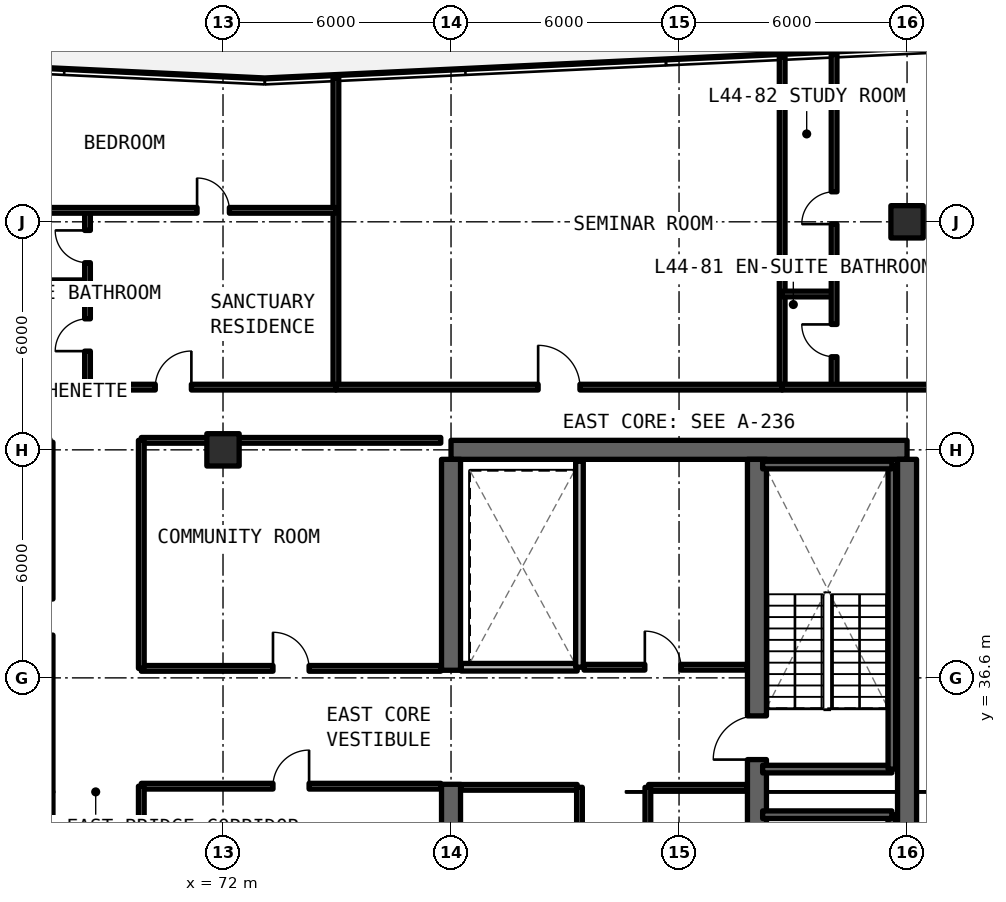
"""IFC4 building model, lengths in metres.
Left out: names, types, materials, properties, quantities, classifications, styles, units other than length and angle.
Written with IfcOpenShell. Run it as: python <this file> out.ifc"""

import sys

from ifc_helpers import new_model, si_unit, direction, frame, frame_2d, origin, origin_2d, place, context, subcontext, project, spatial, rectangle, extrude, element, fill, save


model = new_model("IFC4")
c1 = context("Model", 3, precision=1e-05, world=origin(), true_north=direction((0.0, 1.0)))
c2 = subcontext(c1, "Body", "Model", "MODEL_VIEW")
j1 = project(units=[si_unit("LENGTHUNIT", "METRE"), si_unit("PLANEANGLEUNIT", "RADIAN")], contexts=[c1])
p1 = place(None, origin())
s1 = spatial("IfcSite", under=j1, at=p1, CompositionType="ELEMENT")
p2 = place(p1, origin())
s2 = spatial("IfcBuilding", under=s1, at=p2, CompositionType="ELEMENT")
p3 = place(p2, frame((0.0, 0.0, 158.4)))
s3 = spatial("IfcBuildingStorey", under=s2, at=p3, CompositionType="ELEMENT", Elevation=158.4)
p4 = place(p3, frame((90.0, 42.6, 0.0), z_axis=(0.0, 0.0, 1.0), x_axis=(-1.0, 0.0, 0.0)))
e1 = element("IfcWall", 1, at=p4, inside=s3, PredefinedType="SHEAR", context=c2, shape_type="SweptSolid", body=[
    extrude(rectangle(XDim=12.0, YDim=0.5, at=frame_2d((6.0, 0.0))), origin(), (0.0, 0.0, 1.0), 3.63),
])
p5 = place(p3, frame((90.0, 24.85, 0.0), z_axis=(0.0, 0.0, 1.0), x_axis=(0.0, 1.0, 0.0)))
e2 = element("IfcWall", 2, at=p5, inside=s3, PredefinedType="SHEAR", context=c2, shape_type="SweptSolid", body=[
    extrude(rectangle(XDim=17.5, YDim=0.5, at=frame_2d((8.75, 0.0))), origin(), (0.0, 0.0, 1.0), 3.63),
])
p6 = place(p3, frame((78.0, 24.85, 0.0), z_axis=(0.0, 0.0, 1.0), x_axis=(0.0, 1.0, 0.0)))
e3 = element("IfcWall", 3, at=p6, inside=s3, PredefinedType="SHEAR", context=c2, shape_type="SweptSolid", body=[
    extrude(rectangle(XDim=8.95, YDim=0.5, at=frame_2d((4.475, 0.0))), origin(), (0.0, 0.0, 1.0), 3.63),
])
p7 = place(p3, frame((78.0, 36.8, 0.0), z_axis=(0.0, 0.0, 1.0), x_axis=(0.0, 1.0, 0.0)))
e4 = element("IfcWall", 4, at=p7, inside=s3, PredefinedType="SHEAR", context=c2, shape_type="SweptSolid", body=[
    extrude(rectangle(XDim=5.55, YDim=0.5, at=frame_2d((2.775, 0.0))), origin(), (0.0, 0.0, 1.0), 3.63),
])
p8 = place(p3, frame((86.05, 24.85, 0.0), z_axis=(0.0, 0.0, 1.0), x_axis=(0.0, 1.0, 0.0)))
e5 = element("IfcWall", 5, at=p8, inside=s3, PredefinedType="SHEAR", context=c2, shape_type="SweptSolid", body=[
    extrude(rectangle(XDim=17.5, YDim=0.5, at=frame_2d((8.75, 0.0))), origin(), (0.0, 0.0, 1.0), 3.63),
])
p9 = place(p8, frame((0.4, 0.0, 0.0)))
e6 = element("IfcOpeningElement", 6, at=p9, cuts=e5, PredefinedType="OPENING", context=c2, shape_type="SweptSolid", body=[
    extrude(rectangle(XDim=1.15, YDim=2.15, at=frame_2d((0.575, 1.075))), frame((0.0, 0.26, 0.0), z_axis=(0.0, -1.0, 0.0), x_axis=(1.0, 0.0, 0.0)), (0.0, 0.0, 1.0), 0.52),
])
p10 = place(p8, frame((9.6, 0.0, 0.0)))
e7 = element("IfcOpeningElement", 7, at=p10, cuts=e5, PredefinedType="OPENING", context=c2, shape_type="SweptSolid", body=[
    extrude(rectangle(XDim=1.15, YDim=2.15, at=frame_2d((0.575, 1.075))), frame((0.0, 0.26, 0.0), z_axis=(0.0, -1.0, 0.0), x_axis=(1.0, 0.0, 0.0)), (0.0, 0.0, 1.0), 0.52),
])
for number, where, z_axis, x_axis in (
    (8, (72.0, 42.6, 0.0), (0.0, 0.0, 1.0), (1.0, 0.0, 0.0)),
    (9, (90.0, 48.6, 0.0), (0.0, 0.0, 1.0), (1.0, 0.0, 0.0)),
):
    element("IfcColumn", number, at=place(p3, frame(where, z_axis=z_axis, x_axis=x_axis)), inside=s3, PredefinedType="COLUMN", context=c2, shape_type="SweptSolid", body=[
        extrude(rectangle(XDim=0.85, YDim=0.85, at=origin_2d()), origin(), (0.0, 0.0, 1.0), 3.63),
    ])
p11 = place(p3, frame((83.2, 33.72, 0.0), z_axis=(0.0, 0.0, 1.0), x_axis=(1.0, 0.0, 0.0)))
e10 = element("IfcWall", 10, at=p11, inside=s3, PredefinedType="SOLIDWALL", context=c2, shape_type="SweptSolid", body=[
    extrude(rectangle(XDim=2.58, YDim=0.15, at=frame_2d((1.29, 0.0))), origin(), (0.0, 0.0, 1.0), 2.63),
])
p12 = place(p3, frame((83.18, 28.5, 0.0), z_axis=(0.0, 0.0, 1.0), x_axis=(0.0, 1.0, 0.0)))
e11 = element("IfcWall", 11, at=p12, inside=s3, PredefinedType="SOLIDWALL", context=c2, shape_type="SweptSolid", body=[
    extrude(rectangle(XDim=5.22, YDim=0.15, at=frame_2d((2.61, 0.0))), origin(), (0.0, 0.0, 1.0), 2.63),
])
p13 = place(p12, frame((2.1, 0.0, 0.0)))
e12 = element("IfcOpeningElement", 12, at=p13, cuts=e11, PredefinedType="OPENING", context=c2, shape_type="SweptSolid", body=[
    extrude(rectangle(XDim=0.95, YDim=2.15, at=frame_2d((0.475, 1.075))), frame((0.0, 0.085, 0.0), z_axis=(0.0, -1.0, 0.0), x_axis=(1.0, 0.0, 0.0)), (0.0, 0.0, 1.0), 0.17),
])
p14 = place(p3, frame((78.27, 33.72, 0.0), z_axis=(0.0, 0.0, 1.0), x_axis=(1.0, 0.0, 0.0)))
e13 = element("IfcWall", 13, at=p14, inside=s3, PredefinedType="SOLIDWALL", context=c2, shape_type="SweptSolid", body=[
    extrude(rectangle(XDim=3.05, YDim=0.15, at=frame_2d((1.525, 0.0))), origin(), (0.0, 0.0, 1.0), 2.63),
])
p15 = place(p3, frame((81.38, 28.5, 0.0), z_axis=(0.0, 0.0, 1.0), x_axis=(0.0, 1.0, 0.0)))
e14 = element("IfcWall", 14, at=p15, inside=s3, PredefinedType="SOLIDWALL", context=c2, shape_type="SweptSolid", body=[
    extrude(rectangle(XDim=5.22, YDim=0.15, at=frame_2d((2.61, 0.0))), origin(), (0.0, 0.0, 1.0), 2.63),
])
p16 = place(p15, frame((2.0, 0.0, 0.0)))
e15 = element("IfcOpeningElement", 15, at=p16, cuts=e14, PredefinedType="OPENING", context=c2, shape_type="SweptSolid", body=[
    extrude(rectangle(XDim=0.95, YDim=2.15, at=frame_2d((0.475, 1.075))), frame((0.0, 0.085, 0.0), z_axis=(0.0, -1.0, 0.0), x_axis=(1.0, 0.0, 0.0)), (0.0, 0.0, 1.0), 0.17),
])
p17 = place(p3, frame((81.5, 36.88, 0.0), z_axis=(0.0, 0.0, 1.0), x_axis=(1.0, 0.0, 0.0)))
e16 = element("IfcWall", 16, at=p17, inside=s3, PredefinedType="SOLIDWALL", context=c2, shape_type="SweptSolid", body=[
    extrude(rectangle(XDim=4.28, YDim=0.15, at=frame_2d((2.14, 0.0))), origin(), (0.0, 0.0, 1.0), 2.63),
])
p18 = place(p17, frame((1.6, 0.0, 0.0)))
e17 = element("IfcOpeningElement", 17, at=p18, cuts=e16, PredefinedType="OPENING", context=c2, shape_type="SweptSolid", body=[
    extrude(rectangle(XDim=0.95, YDim=2.15, at=frame_2d((0.475, 1.075))), frame((0.0, 0.085, 0.0), z_axis=(0.0, -1.0, 0.0), x_axis=(1.0, 0.0, 0.0)), (0.0, 0.0, 1.0), 0.17),
])
p19 = place(p3, frame((78.27, 36.88, 0.0), z_axis=(0.0, 0.0, 1.0), x_axis=(1.0, 0.0, 0.0)))
e18 = element("IfcWall", 18, at=p19, inside=s3, PredefinedType="SOLIDWALL", context=c2, shape_type="SweptSolid", body=[
    extrude(rectangle(XDim=3.05, YDim=0.2, at=frame_2d((1.525, 0.0))), origin(), (0.0, 0.0, 1.0), 2.63),
])
p20 = place(p3, frame((81.38, 36.88, 0.0), z_axis=(0.0, 0.0, 1.0), x_axis=(0.0, 1.0, 0.0)))
e19 = element("IfcWall", 19, at=p20, inside=s3, PredefinedType="SOLIDWALL", context=c2, shape_type="SweptSolid", body=[
    extrude(rectangle(XDim=5.42, YDim=0.2, at=frame_2d((2.71, 0.0))), origin(), (0.0, 0.0, 1.0), 2.63),
])
p21 = place(p3, frame((69.85, 33.75, 0.0), z_axis=(0.0, 0.0, 1.0), x_axis=(1.0, 0.0, 0.0)))
e20 = element("IfcWall", 20, at=p21, inside=s3, PredefinedType="SOLIDWALL", context=c2, shape_type="SweptSolid", body=[
    extrude(rectangle(XDim=7.88, YDim=0.15, at=frame_2d((3.94, 0.0))), origin(), (0.0, 0.0, 1.0), 2.63),
])
p22 = place(p21, frame((3.465, 0.0, 0.0)))
e21 = element("IfcOpeningElement", 21, at=p22, cuts=e20, PredefinedType="OPENING", context=c2, shape_type="SweptSolid", body=[
    extrude(rectangle(XDim=0.95, YDim=2.15, at=frame_2d((0.475, 1.075))), frame((0.0, 0.085, 0.0), z_axis=(0.0, -1.0, 0.0), x_axis=(1.0, 0.0, 0.0)), (0.0, 0.0, 1.0), 0.17),
])
p23 = place(p3, frame((69.85, 24.35, 0.0), z_axis=(0.0, 0.0, 1.0), x_axis=(0.0, 1.0, 0.0)))
e22 = element("IfcWall", 22, at=p23, inside=s3, PredefinedType="SOLIDWALL", context=c2, shape_type="SweptSolid", body=[
    extrude(rectangle(XDim=9.4, YDim=0.15, at=frame_2d((4.7, 0.0))), origin(), (0.0, 0.0, 1.0), 2.63),
])
p24 = place(p3, frame((69.85, 36.85, 0.0), z_axis=(0.0, 0.0, 1.0), x_axis=(1.0, 0.0, 0.0)))
e23 = element("IfcWall", 23, at=p24, inside=s3, PredefinedType="SOLIDWALL", context=c2, shape_type="SweptSolid", body=[
    extrude(rectangle(XDim=7.88, YDim=0.15, at=frame_2d((3.94, 0.0))), origin(), (0.0, 0.0, 1.0), 2.63),
])
p25 = place(p24, frame((3.465, 0.0, 0.0)))
e24 = element("IfcOpeningElement", 24, at=p25, cuts=e23, PredefinedType="OPENING", context=c2, shape_type="SweptSolid", body=[
    extrude(rectangle(XDim=0.95, YDim=2.15, at=frame_2d((0.475, 1.075))), frame((0.0, 0.085, 0.0), z_axis=(0.0, -1.0, 0.0), x_axis=(1.0, 0.0, 0.0)), (0.0, 0.0, 1.0), 0.17),
])
p26 = place(p3, frame((69.85, 42.85, 0.0), z_axis=(0.0, 0.0, 1.0), x_axis=(1.0, 0.0, 0.0)))
e25 = element("IfcWall", 25, at=p26, inside=s3, PredefinedType="SOLIDWALL", context=c2, shape_type="SweptSolid", body=[
    extrude(rectangle(XDim=7.88, YDim=0.15, at=frame_2d((3.94, 0.0))), origin(), (0.0, 0.0, 1.0), 2.63),
])
p27 = place(p3, frame((69.85, 36.85, 0.0), z_axis=(0.0, 0.0, 1.0), x_axis=(0.0, 1.0, 0.0)))
e26 = element("IfcWall", 26, at=p27, inside=s3, PredefinedType="SOLIDWALL", context=c2, shape_type="SweptSolid", body=[
    extrude(rectangle(XDim=6.0, YDim=0.15, at=frame_2d((3.0, 0.0))), origin(), (0.0, 0.0, 1.0), 2.63),
])
p28 = place(p3, frame((67.45, 24.4, 0.0), z_axis=(0.0, 0.0, 1.0), x_axis=(0.0, 1.0, 0.0)))
e27 = element("IfcWall", 27, at=p28, inside=s3, PredefinedType="SOLIDWALL", context=c2, shape_type="SweptSolid", body=[
    extrude(rectangle(XDim=9.2, YDim=0.15, at=frame_2d((4.6, 0.0))), origin(), (0.0, 0.0, 1.0), 2.63),
])
p29 = place(p28, frame((4.125, 0.0, 0.0)))
e28 = element("IfcOpeningElement", 28, at=p29, cuts=e27, PredefinedType="OPENING", context=c2, shape_type="SweptSolid", body=[
    extrude(rectangle(XDim=0.95, YDim=2.15, at=frame_2d((0.475, 1.075))), frame((0.0, 0.085, 0.0), z_axis=(0.0, -1.0, 0.0), x_axis=(1.0, 0.0, 0.0)), (0.0, 0.0, 1.0), 0.17),
])
p30 = place(p3, frame((67.45, 33.6, 0.0), z_axis=(0.0, 0.0, 1.0), x_axis=(0.0, 1.0, 0.0)))
e29 = element("IfcWall", 29, at=p30, inside=s3, PredefinedType="SOLIDWALL", context=c2, shape_type="SweptSolid", body=[
    extrude(rectangle(XDim=9.2, YDim=0.15, at=frame_2d((4.6, 0.0))), origin(), (0.0, 0.0, 1.0), 2.63),
])
p31 = place(p30, frame((4.125, 0.0, 0.0)))
e30 = element("IfcOpeningElement", 30, at=p31, cuts=e29, PredefinedType="OPENING", context=c2, shape_type="SweptSolid", body=[
    extrude(rectangle(XDim=0.95, YDim=2.15, at=frame_2d((0.475, 1.075))), frame((0.0, 0.085, 0.0), z_axis=(0.0, -1.0, 0.0), x_axis=(1.0, 0.0, 0.0)), (0.0, 0.0, 1.0), 0.17),
])
p32 = place(p3, frame((74.971, 44.25, 0.0), z_axis=(0.0, 0.0, 1.0), x_axis=(0.0, 1.0, 0.0)))
e31 = element("IfcWall", 31, at=p32, inside=s3, PredefinedType="SOLIDWALL", context=c2, shape_type="SweptSolid", body=[
    extrude(rectangle(XDim=8.134, YDim=0.15, at=frame_2d((4.067, 0.0))), origin(), (0.0, 0.0, 1.0), 2.63),
])
p33 = place(p3, frame((66.084, 46.995, 0.0), z_axis=(0.0, 0.0, 1.0), x_axis=(1.0, 0.0, 0.0)))
e32 = element("IfcWall", 32, at=p33, inside=s3, PredefinedType="PARTITIONING", context=c2, shape_type="SweptSolid", body=[
    extrude(rectangle(XDim=2.35, YDim=0.15, at=frame_2d((1.175, 0.0))), origin(), (0.0, 0.0, 1.0), 2.63),
])
p34 = place(p3, frame((68.434, 44.25, 0.0), z_axis=(0.0, 0.0, 1.0), x_axis=(0.0, 1.0, 0.0)))
e33 = element("IfcWall", 33, at=p34, inside=s3, PredefinedType="PARTITIONING", context=c2, shape_type="SweptSolid", body=[
    extrude(rectangle(XDim=4.652, YDim=0.15, at=frame_2d((2.326, 0.0))), origin(), (0.0, 0.0, 1.0), 2.63),
])
p35 = place(p34, frame((0.948, 0.0, 0.0)))
e34 = element("IfcOpeningElement", 34, at=p35, cuts=e33, PredefinedType="OPENING", context=c2, shape_type="SweptSolid", body=[
    extrude(rectangle(XDim=0.85, YDim=2.1, at=frame_2d((0.425, 1.05))), frame((0.0, 0.085, 0.0), z_axis=(0.0, -1.0, 0.0), x_axis=(1.0, 0.0, 0.0)), (0.0, 0.0, 1.0), 0.17),
])
p36 = place(p34, frame((3.273, 0.0, 0.0)))
e35 = element("IfcOpeningElement", 35, at=p36, cuts=e33, PredefinedType="OPENING", context=c2, shape_type="SweptSolid", body=[
    extrude(rectangle(XDim=0.85, YDim=2.1, at=frame_2d((0.425, 1.05))), frame((0.0, 0.085, 0.0), z_axis=(0.0, -1.0, 0.0), x_axis=(1.0, 0.0, 0.0)), (0.0, 0.0, 1.0), 0.17),
])
p37 = place(p3, frame((66.084, 48.902, 0.0), z_axis=(0.0, 0.0, 1.0), x_axis=(1.0, 0.0, 0.0)))
e36 = element("IfcWall", 36, at=p37, inside=s3, PredefinedType="PARTITIONING", context=c2, shape_type="SweptSolid", body=[
    extrude(rectangle(XDim=8.886, YDim=0.15, at=frame_2d((4.443, 0.0))), origin(), (0.0, 0.0, 1.0), 2.63),
])
p38 = place(p37, frame((5.233, 0.0, 0.0)))
e37 = element("IfcOpeningElement", 37, at=p38, cuts=e36, PredefinedType="OPENING", context=c2, shape_type="SweptSolid", body=[
    extrude(rectangle(XDim=0.85, YDim=2.1, at=frame_2d((0.425, 1.05))), frame((0.0, 0.085, 0.0), z_axis=(0.0, -1.0, 0.0), x_axis=(1.0, 0.0, 0.0)), (0.0, 0.0, 1.0), 0.17),
])
p39 = place(p3, frame((66.084, 44.25, 0.0), z_axis=(0.0, 0.0, 1.0), x_axis=(1.0, 0.0, 0.0)))
e38 = element("IfcWall", 38, at=p39, inside=s3, PredefinedType="SOLIDWALL", context=c2, shape_type="SweptSolid", body=[
    extrude(rectangle(XDim=8.886, YDim=0.15, at=frame_2d((4.443, 0.0))), origin(), (0.0, 0.0, 1.0), 2.63),
])
p40 = place(p39, frame((4.133, 0.0, 0.0)))
e39 = element("IfcOpeningElement", 39, at=p40, cuts=e38, PredefinedType="OPENING", context=c2, shape_type="SweptSolid", body=[
    extrude(rectangle(XDim=0.95, YDim=2.15, at=frame_2d((0.475, 1.075))), frame((0.0, 0.085, 0.0), z_axis=(0.0, -1.0, 0.0), x_axis=(1.0, 0.0, 0.0)), (0.0, 0.0, 1.0), 0.17),
])
p41 = place(p3, frame((86.714, 44.25, 0.0), z_axis=(0.0, 0.0, 1.0), x_axis=(0.0, 1.0, 0.0)))
e40 = element("IfcWall", 40, at=p41, inside=s3, PredefinedType="SOLIDWALL", context=c2, shape_type="SweptSolid", body=[
    extrude(rectangle(XDim=8.69, YDim=0.15, at=frame_2d((4.345, 0.0))), origin(), (0.0, 0.0, 1.0), 2.63),
])
p42 = place(p3, frame((74.971, 44.25, 0.0), z_axis=(0.0, 0.0, 1.0), x_axis=(1.0, 0.0, 0.0)))
e41 = element("IfcWall", 41, at=p42, inside=s3, PredefinedType="SOLIDWALL", context=c2, shape_type="SweptSolid", body=[
    extrude(rectangle(XDim=11.743, YDim=0.15, at=frame_2d((5.872, 0.0))), origin(), (0.0, 0.0, 1.0), 2.63),
])
p43 = place(p42, frame((5.321, 0.0, 0.0)))
e42 = element("IfcOpeningElement", 42, at=p43, cuts=e41, PredefinedType="OPENING", context=c2, shape_type="SweptSolid", body=[
    extrude(rectangle(XDim=1.1, YDim=2.15, at=frame_2d((0.55, 1.075))), frame((0.0, 0.085, 0.0), z_axis=(0.0, -1.0, 0.0), x_axis=(1.0, 0.0, 0.0)), (0.0, 0.0, 1.0), 0.17),
])
p44 = place(p3, frame((86.714, 46.7, 0.0), z_axis=(0.0, 0.0, 1.0), x_axis=(1.0, 0.0, 0.0)))
e43 = element("IfcWall", 43, at=p44, inside=s3, PredefinedType="PARTITIONING", context=c2, shape_type="SweptSolid", body=[
    extrude(rectangle(XDim=1.366, YDim=0.15, at=frame_2d((0.683, 0.0))), origin(), (0.0, 0.0, 1.0), 2.63),
])
p45 = place(p3, frame((88.08, 44.25, 0.0), z_axis=(0.0, 0.0, 1.0), x_axis=(0.0, 1.0, 0.0)))
e44 = element("IfcWall", 44, at=p45, inside=s3, PredefinedType="PARTITIONING", context=c2, shape_type="SweptSolid", body=[
    extrude(rectangle(XDim=8.755, YDim=0.15, at=frame_2d((4.377, 0.0))), origin(), (0.0, 0.0, 1.0), 2.63),
])
p46 = place(p45, frame((0.8, 0.0, 0.0)))
e45 = element("IfcOpeningElement", 45, at=p46, cuts=e44, PredefinedType="OPENING", context=c2, shape_type="SweptSolid", body=[
    extrude(rectangle(XDim=0.85, YDim=2.1, at=frame_2d((0.425, 1.05))), frame((0.0, 0.085, 0.0), z_axis=(0.0, -1.0, 0.0), x_axis=(1.0, 0.0, 0.0)), (0.0, 0.0, 1.0), 0.17),
])
p47 = place(p45, frame((4.29, 0.0, 0.0)))
e46 = element("IfcOpeningElement", 46, at=p47, cuts=e44, PredefinedType="OPENING", context=c2, shape_type="SweptSolid", body=[
    extrude(rectangle(XDim=0.85, YDim=2.1, at=frame_2d((0.425, 1.05))), frame((0.0, 0.085, 0.0), z_axis=(0.0, -1.0, 0.0), x_axis=(1.0, 0.0, 0.0)), (0.0, 0.0, 1.0), 0.17),
])
p48 = place(p3, frame((86.714, 44.25, 0.0), z_axis=(0.0, 0.0, 1.0), x_axis=(1.0, 0.0, 0.0)))
e47 = element("IfcWall", 47, at=p48, inside=s3, PredefinedType="SOLIDWALL", context=c2, shape_type="SweptSolid", body=[
    extrude(rectangle(XDim=8.886, YDim=0.15, at=frame_2d((4.443, 0.0))), origin(), (0.0, 0.0, 1.0), 2.63),
])
p49 = place(p48, frame((4.691, 0.0, 0.0)))
e48 = element("IfcOpeningElement", 48, at=p49, cuts=e47, PredefinedType="OPENING", context=c2, shape_type="SweptSolid", body=[
    extrude(rectangle(XDim=0.95, YDim=2.15, at=frame_2d((0.475, 1.075))), frame((0.0, 0.085, 0.0), z_axis=(0.0, -1.0, 0.0), x_axis=(1.0, 0.0, 0.0)), (0.0, 0.0, 1.0), 0.17),
])
p50 = place(p3, frame((89.6, 25.0, 0.0), z_axis=(0.0, 0.0, 1.0), x_axis=(0.0, 1.0, 0.0)))
e49 = element("IfcWall", 49, at=p50, inside=s3, PredefinedType="SOLIDWALL", context=c2, shape_type="SweptSolid", body=[
    extrude(rectangle(XDim=8.0, YDim=0.2, at=frame_2d((4.0, 0.0))), origin(), (0.0, 0.0, 1.0), 3.63),
])
for number, where, z_axis, x_axis in (
    (50, (89.6, 33.0, 0.0), (0.0, 0.0, 1.0), (-1.0, 0.0, 0.0)),
    (51, (86.2, 34.2, 0.0), (0.0, 0.0, 1.0), (1.0, 0.0, 0.0)),
):
    element("IfcWall", number, at=place(p3, frame(where, z_axis=z_axis, x_axis=x_axis)), inside=s3, PredefinedType="SOLIDWALL", context=c2, shape_type="SweptSolid", body=[
        extrude(rectangle(XDim=3.4, YDim=0.2, at=frame_2d((1.7, 0.0))), origin(), (0.0, 0.0, 1.0), 3.63),
    ])
p51 = place(p3, frame((89.6, 34.2, 0.0), z_axis=(0.0, 0.0, 1.0), x_axis=(0.0, 1.0, 0.0)))
e52 = element("IfcWall", 52, at=p51, inside=s3, PredefinedType="SOLIDWALL", context=c2, shape_type="SweptSolid", body=[
    extrude(rectangle(XDim=8.0, YDim=0.2, at=frame_2d((4.0, 0.0))), origin(), (0.0, 0.0, 1.0), 3.63),
])
p52 = place(p3, frame((89.6, 42.2, 0.0), z_axis=(0.0, 0.0, 1.0), x_axis=(-1.0, 0.0, 0.0)))
e53 = element("IfcWall", 53, at=p52, inside=s3, PredefinedType="SOLIDWALL", context=c2, shape_type="SweptSolid", body=[
    extrude(rectangle(XDim=3.4, YDim=0.2, at=frame_2d((1.7, 0.0))), origin(), (0.0, 0.0, 1.0), 3.63),
])
p53 = place(p18, origin())
e54 = element("IfcDoor", 54, at=p53, inside=s3, OperationType="SINGLE_SWING_LEFT", PredefinedType="DOOR", context=c2, shape_type="SweptSolid", body=[
    extrude(rectangle(XDim=0.95, YDim=2.15, at=frame_2d((0.475, 1.075))), frame((0.0, 0.025, 0.0), z_axis=(0.0, -1.0, 0.0), x_axis=(1.0, 0.0, 0.0)), (0.0, 0.0, 1.0), 0.05),
])
fill(e17, e54)
p54 = place(p22, origin())
e55 = element("IfcDoor", 55, at=p54, inside=s3, OperationType="SINGLE_SWING_RIGHT", PredefinedType="DOOR", context=c2, shape_type="SweptSolid", body=[
    extrude(rectangle(XDim=0.95, YDim=2.15, at=frame_2d((0.475, 1.075))), frame((0.0, 0.025, 0.0), z_axis=(0.0, -1.0, 0.0), x_axis=(1.0, 0.0, 0.0)), (0.0, 0.0, 1.0), 0.05),
])
fill(e21, e55)
p55 = place(p25, origin())
e56 = element("IfcDoor", 56, at=p55, inside=s3, OperationType="SINGLE_SWING_LEFT", PredefinedType="DOOR", context=c2, shape_type="SweptSolid", body=[
    extrude(rectangle(XDim=0.95, YDim=2.15, at=frame_2d((0.475, 1.075))), frame((0.0, 0.025, 0.0), z_axis=(0.0, -1.0, 0.0), x_axis=(1.0, 0.0, 0.0)), (0.0, 0.0, 1.0), 0.05),
])
fill(e24, e56)
p56 = place(p35, origin())
e57 = element("IfcDoor", 57, at=p56, inside=s3, OperationType="SINGLE_SWING_LEFT", PredefinedType="DOOR", context=c2, shape_type="SweptSolid", body=[
    extrude(rectangle(XDim=0.85, YDim=2.1, at=frame_2d((0.425, 1.05))), frame((0.0, 0.025, 0.0), z_axis=(0.0, -1.0, 0.0), x_axis=(1.0, 0.0, 0.0)), (0.0, 0.0, 1.0), 0.05),
])
fill(e34, e57)
p57 = place(p36, origin())
e58 = element("IfcDoor", 58, at=p57, inside=s3, OperationType="SINGLE_SWING_RIGHT", PredefinedType="DOOR", context=c2, shape_type="SweptSolid", body=[
    extrude(rectangle(XDim=0.85, YDim=2.1, at=frame_2d((0.425, 1.05))), frame((0.0, 0.025, 0.0), z_axis=(0.0, -1.0, 0.0), x_axis=(1.0, 0.0, 0.0)), (0.0, 0.0, 1.0), 0.05),
])
fill(e35, e58)
p58 = place(p38, origin())
e59 = element("IfcDoor", 59, at=p58, inside=s3, OperationType="SINGLE_SWING_LEFT", PredefinedType="DOOR", context=c2, shape_type="SweptSolid", body=[
    extrude(rectangle(XDim=0.85, YDim=2.1, at=frame_2d((0.425, 1.05))), frame((0.0, 0.025, 0.0), z_axis=(0.0, -1.0, 0.0), x_axis=(1.0, 0.0, 0.0)), (0.0, 0.0, 1.0), 0.05),
])
fill(e37, e59)
p59 = place(p40, origin())
e60 = element("IfcDoor", 60, at=p59, inside=s3, OperationType="SINGLE_SWING_RIGHT", PredefinedType="DOOR", context=c2, shape_type="SweptSolid", body=[
    extrude(rectangle(XDim=0.95, YDim=2.15, at=frame_2d((0.475, 1.075))), frame((0.0, 0.025, 0.0), z_axis=(0.0, -1.0, 0.0), x_axis=(1.0, 0.0, 0.0)), (0.0, 0.0, 1.0), 0.05),
])
fill(e39, e60)
p60 = place(p43, origin())
e61 = element("IfcDoor", 61, at=p60, inside=s3, OperationType="SINGLE_SWING_LEFT", PredefinedType="DOOR", context=c2, shape_type="SweptSolid", body=[
    extrude(rectangle(XDim=1.1, YDim=2.15, at=frame_2d((0.55, 1.075))), frame((0.0, 0.025, 0.0), z_axis=(0.0, -1.0, 0.0), x_axis=(1.0, 0.0, 0.0)), (0.0, 0.0, 1.0), 0.05),
])
fill(e42, e61)
p61 = place(p46, origin())
e62 = element("IfcDoor", 62, at=p61, inside=s3, OperationType="SINGLE_SWING_RIGHT", PredefinedType="DOOR", context=c2, shape_type="SweptSolid", body=[
    extrude(rectangle(XDim=0.85, YDim=2.1, at=frame_2d((0.425, 1.05))), frame((0.0, 0.025, 0.0), z_axis=(0.0, -1.0, 0.0), x_axis=(1.0, 0.0, 0.0)), (0.0, 0.0, 1.0), 0.05),
])
fill(e45, e62)
p62 = place(p47, origin())
e63 = element("IfcDoor", 63, at=p62, inside=s3, OperationType="SINGLE_SWING_LEFT", PredefinedType="DOOR", context=c2, shape_type="SweptSolid", body=[
    extrude(rectangle(XDim=0.85, YDim=2.1, at=frame_2d((0.425, 1.05))), frame((0.0, 0.025, 0.0), z_axis=(0.0, -1.0, 0.0), x_axis=(1.0, 0.0, 0.0)), (0.0, 0.0, 1.0), 0.05),
])
fill(e46, e63)
p63 = place(p10, origin())
e64 = element("IfcDoor", 64, at=p63, inside=s3, OperationType="SINGLE_SWING_RIGHT", PredefinedType="DOOR", context=c2, shape_type="SweptSolid", body=[
    extrude(rectangle(XDim=1.15, YDim=2.15, at=frame_2d((0.575, 1.075))), frame((0.0, 0.025, 0.0), z_axis=(0.0, -1.0, 0.0), x_axis=(1.0, 0.0, 0.0)), (0.0, 0.0, 1.0), 0.05),
])
fill(e7, e64)
save(model, sys.argv[1])
